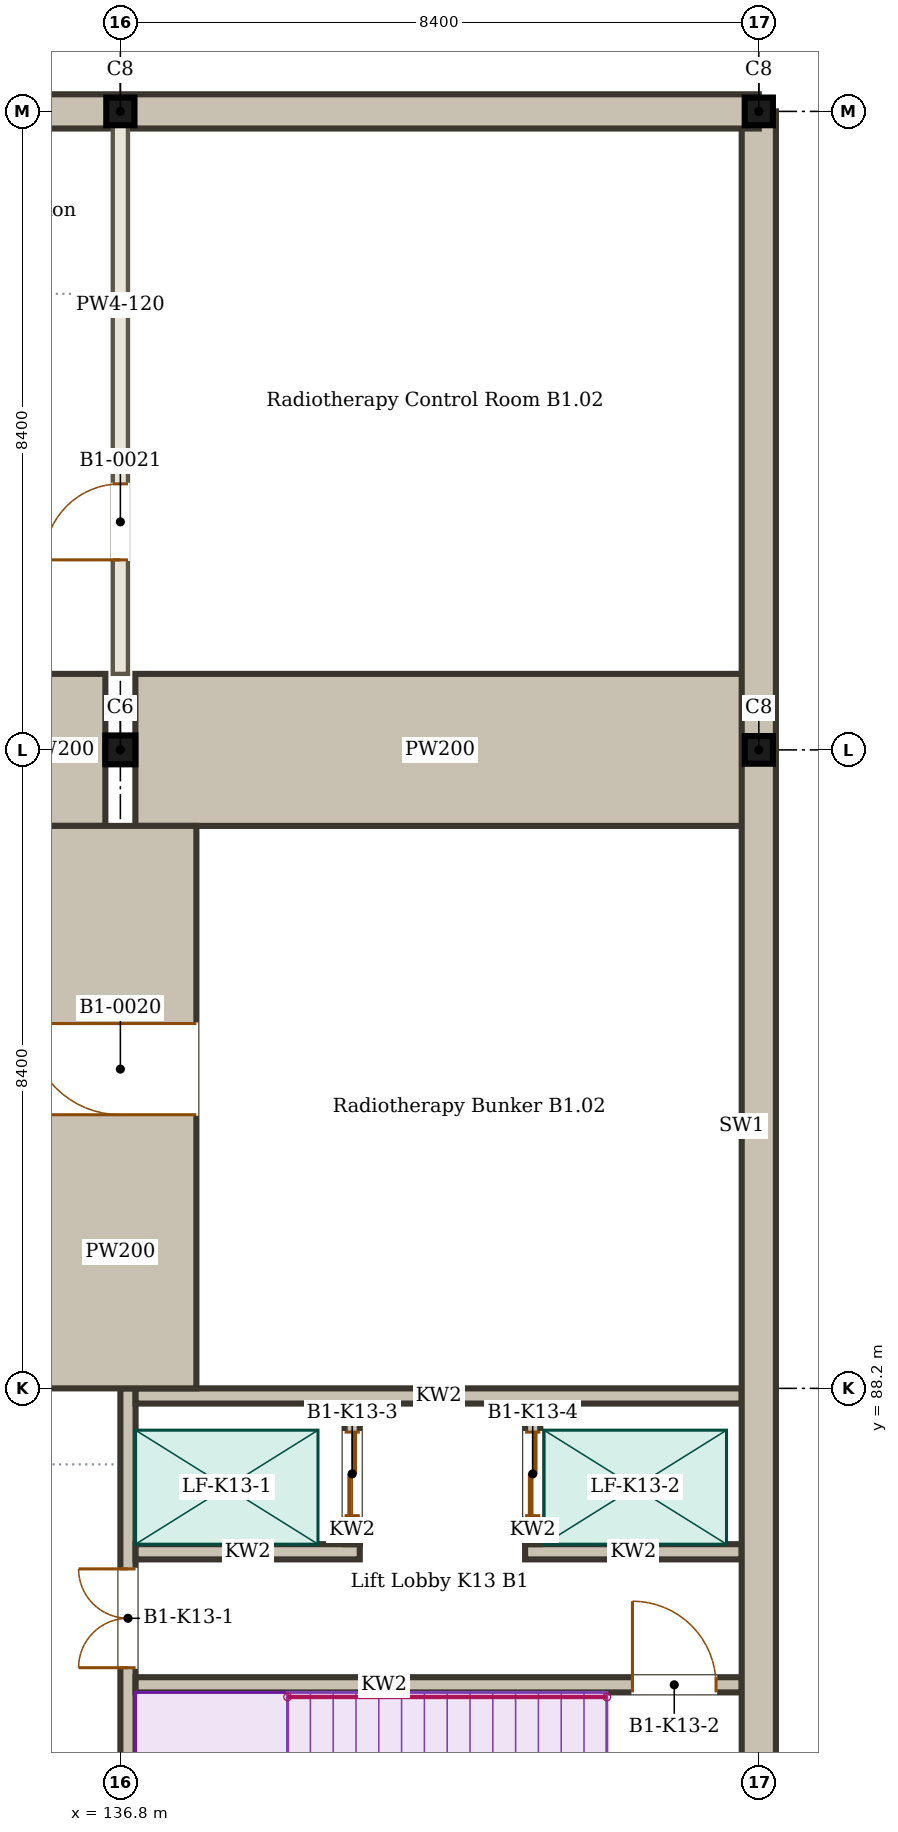
"""IFC4 building model, lengths in metres.
Left out: names, types, materials, properties, quantities, classifications, styles, units other than length and angle.
Written with IfcOpenShell. Run it as: python <this file> out.ifc"""

import sys

from ifc_helpers import new_model, si_unit, direction, frame, frame_2d, origin, origin_2d, place, context, subcontext, project, spatial, rectangle, i_section, extrude, element, fill, save


model = new_model("IFC4")
c1 = context("Model", 3, precision=1e-05, world=origin(), true_north=direction((0.0, 1.0)))
c2 = subcontext(c1, "Body", "Model", "MODEL_VIEW")
j1 = project(units=[si_unit("LENGTHUNIT", "METRE"), si_unit("PLANEANGLEUNIT", "RADIAN")], contexts=[c1])
p1 = place(None, origin())
s1 = spatial("IfcSite", under=j1, at=p1, CompositionType="ELEMENT")
p2 = place(p1, origin())
s2 = spatial("IfcBuilding", under=s1, at=p2, CompositionType="ELEMENT")
p3 = place(p2, frame((0.0, 0.0, -4.5)))
s3 = spatial("IfcBuildingStorey", under=s2, at=p3, CompositionType="ELEMENT", Elevation=-4.5)
p4 = place(p3, frame((136.8, 96.6, 0.0), z_axis=(0.0, 0.0, 1.0), x_axis=(1.0, 0.0, 0.0)))
e1 = element("IfcColumn", 1, at=p4, inside=s3, PredefinedType="COLUMN", context=c2, shape_type="SweptSolid", body=[
    extrude(i_section(OverallWidth=0.395, OverallDepth=0.38, WebThickness=0.019, FlangeThickness=0.03, FilletRadius=0.027, at=origin_2d()), origin(), (0.0, 0.0, 1.0), 4.5),
])
for number, where, z_axis, x_axis in (
    (2, (145.2, 96.6, 0.0), (0.0, 0.0, 1.0), (1.0, 0.0, 0.0)),
    (3, (136.8, 105.0, 0.0), (0.0, 0.0, 1.0), (1.0, 0.0, 0.0)),
    (4, (145.2, 105.0, 0.0), (0.0, 0.0, 1.0), (1.0, 0.0, 0.0)),
):
    element("IfcColumn", number, at=place(p3, frame(where, z_axis=z_axis, x_axis=x_axis)), inside=s3, PredefinedType="COLUMN", context=c2, shape_type="SweptSolid", body=[
        extrude(i_section(OverallWidth=0.371, OverallDepth=0.364, WebThickness=0.013, FlangeThickness=0.022, FilletRadius=0.027, at=origin_2d()), origin(), (0.0, 0.0, 1.0), 4.5),
    ])
p5 = place(p3, frame((145.2, 29.4, 0.0), z_axis=(0.0, 0.0, 1.0), x_axis=(0.0, 1.0, 0.0)))
e5 = element("IfcWall", 5, at=p5, inside=s3, PredefinedType="SOLIDWALL", context=c2, shape_type="SweptSolid", body=[
    extrude(rectangle(XDim=75.6, YDim=0.45, at=frame_2d((37.8, 0.0))), origin(), (0.0, 0.0, 1.0), 4.35),
])
p6 = place(p3, frame((145.2, 105.0, 0.0), z_axis=(0.0, 0.0, 1.0), x_axis=(-1.0, 0.0, 0.0)))
e6 = element("IfcWall", 6, at=p6, inside=s3, PredefinedType="SOLIDWALL", context=c2, shape_type="SweptSolid", body=[
    extrude(rectangle(XDim=33.6, YDim=0.45, at=frame_2d((16.8, 0.0))), origin(), (0.0, 0.0, 1.0), 4.35),
])
p7 = place(p3, frame((135.8, 96.6, 0.0), z_axis=(0.0, 0.0, 1.0), x_axis=(1.0, 0.0, 0.0)))
e7 = element("IfcWall", 7, at=p7, inside=s3, PredefinedType="SOLIDWALL", context=c2, shape_type="SweptSolid", body=[
    extrude(rectangle(XDim=0.802, YDim=2.0, at=frame_2d((0.401, 0.0))), origin(), (0.0, 0.0, 1.0), 3.8),
])
p8 = place(p3, frame((136.998, 96.6, 0.0), z_axis=(0.0, 0.0, 1.0), x_axis=(1.0, 0.0, 0.0)))
e8 = element("IfcWall", 8, at=p8, inside=s3, PredefinedType="SOLIDWALL", context=c2, shape_type="SweptSolid", body=[
    extrude(rectangle(XDim=8.017, YDim=2.0, at=frame_2d((4.008, 0.0))), origin(), (0.0, 0.0, 1.0), 3.8),
])
p9 = place(p3, frame((136.8, 88.2, 0.0), z_axis=(0.0, 0.0, 1.0), x_axis=(0.0, 1.0, 0.0)))
e9 = element("IfcWall", 9, at=p9, inside=s3, PredefinedType="SOLIDWALL", context=c2, shape_type="SweptSolid", body=[
    extrude(rectangle(XDim=7.4, YDim=2.0, at=frame_2d((3.7, 0.0))), origin(), (0.0, 0.0, 1.0), 3.8),
])
p10 = place(p9, frame((3.6, 0.0, 0.0)))
e10 = element("IfcOpeningElement", 10, at=p10, cuts=e9, PredefinedType="OPENING", context=c2, shape_type="SweptSolid", body=[
    extrude(rectangle(XDim=1.2, YDim=2.1, at=frame_2d((0.6, 1.05))), frame((0.0, 1.01, 0.0), z_axis=(0.0, -1.0, 0.0), x_axis=(1.0, 0.0, 0.0)), (0.0, 0.0, 1.0), 2.02),
])
p11 = place(p3, frame((136.8, 97.6, 0.0), z_axis=(0.0, 0.0, 1.0), x_axis=(0.0, 1.0, 0.0)))
e11 = element("IfcWall", 11, at=p11, inside=s3, PredefinedType="PARTITIONING", context=c2, shape_type="SweptSolid", body=[
    extrude(rectangle(XDim=7.214, YDim=0.2, at=frame_2d((3.607, 0.0))), origin(), (0.0, 0.0, 1.0), 3.8),
])
p12 = place(p11, frame((1.5, 0.0, 0.0)))
e12 = element("IfcOpeningElement", 12, at=p12, cuts=e11, PredefinedType="OPENING", context=c2, shape_type="SweptSolid", body=[
    extrude(rectangle(XDim=1.0, YDim=2.1, at=frame_2d((0.5, 1.05))), frame((0.0, 0.11, 0.0), z_axis=(0.0, -1.0, 0.0), x_axis=(1.0, 0.0, 0.0)), (0.0, 0.0, 1.0), 0.22),
])
p13 = place(p3, frame((136.9, 79.8, 0.0), z_axis=(0.0, 0.0, 1.0), x_axis=(0.0, 1.0, 0.0)))
e13 = element("IfcWall", 13, at=p13, inside=s3, PredefinedType="SOLIDWALL", context=c2, shape_type="SweptSolid", body=[
    extrude(rectangle(XDim=8.4, YDim=0.2, at=frame_2d((4.2, 0.0))), origin(), (0.0, 0.0, 1.0), 4.5),
])
p14 = place(p13, frame((4.725, 0.0, 0.0)))
e14 = element("IfcOpeningElement", 14, at=p14, cuts=e13, PredefinedType="OPENING", context=c2, shape_type="SweptSolid", body=[
    extrude(rectangle(XDim=1.3, YDim=2.1, at=frame_2d((0.65, 1.05))), frame((0.0, 0.11, 0.0), z_axis=(0.0, -1.0, 0.0), x_axis=(1.0, 0.0, 0.0)), (0.0, 0.0, 1.0), 0.22),
])
p15 = place(p3, frame((137.0, 88.1, 0.0), z_axis=(0.0, 0.0, 1.0), x_axis=(1.0, 0.0, 0.0)))
e15 = element("IfcWall", 15, at=p15, inside=s3, PredefinedType="SOLIDWALL", context=c2, shape_type="SweptSolid", body=[
    extrude(rectangle(XDim=7.975, YDim=0.2, at=frame_2d((3.988, 0.0))), origin(), (0.0, 0.0, 1.0), 4.5),
])
p16 = place(p3, frame((137.0, 84.3, 0.0), z_axis=(0.0, 0.0, 1.0), x_axis=(1.0, 0.0, 0.0)))
e16 = element("IfcWall", 16, at=p16, inside=s3, PredefinedType="SOLIDWALL", context=c2, shape_type="SweptSolid", body=[
    extrude(rectangle(XDim=7.975, YDim=0.2, at=frame_2d((3.988, 0.0))), origin(), (0.0, 0.0, 1.0), 4.5),
])
p17 = place(p16, frame((6.538, 0.0, 0.0)))
e17 = element("IfcOpeningElement", 17, at=p17, cuts=e16, PredefinedType="OPENING", context=c2, shape_type="SweptSolid", body=[
    extrude(rectangle(XDim=1.1, YDim=2.1, at=frame_2d((0.55, 1.05))), frame((0.0, 0.11, 0.0), z_axis=(0.0, -1.0, 0.0), x_axis=(1.0, 0.0, 0.0)), (0.0, 0.0, 1.0), 0.22),
])
p18 = place(p3, frame((137.0, 86.05, 0.0), z_axis=(0.0, 0.0, 1.0), x_axis=(1.0, 0.0, 0.0)))
e18 = element("IfcWall", 18, at=p18, inside=s3, PredefinedType="SOLIDWALL", context=c2, shape_type="SweptSolid", body=[
    extrude(rectangle(XDim=2.95, YDim=0.2, at=frame_2d((1.475, 0.0))), origin(), (0.0, 0.0, 1.0), 4.5),
])
p19 = place(p3, frame((142.125, 86.05, 0.0), z_axis=(0.0, 0.0, 1.0), x_axis=(1.0, 0.0, 0.0)))
e19 = element("IfcWall", 19, at=p19, inside=s3, PredefinedType="SOLIDWALL", context=c2, shape_type="SweptSolid", body=[
    extrude(rectangle(XDim=2.85, YDim=0.2, at=frame_2d((1.425, 0.0))), origin(), (0.0, 0.0, 1.0), 4.5),
])
p20 = place(p3, frame((139.85, 86.15, 0.0), z_axis=(0.0, 0.0, 1.0), x_axis=(0.0, 1.0, 0.0)))
e20 = element("IfcWall", 20, at=p20, inside=s3, PredefinedType="SOLIDWALL", context=c2, shape_type="SweptSolid", body=[
    extrude(rectangle(XDim=1.85, YDim=0.2, at=frame_2d((0.925, 0.0))), origin(), (0.0, 0.0, 1.0), 4.5),
])
p21 = place(p20, frame((0.375, 0.0, 0.0)))
e21 = element("IfcOpeningElement", 21, at=p21, cuts=e20, PredefinedType="OPENING", context=c2, shape_type="SweptSolid", body=[
    extrude(rectangle(XDim=1.1, YDim=2.1, at=frame_2d((0.55, 1.05))), frame((0.0, 0.11, 0.0), z_axis=(0.0, -1.0, 0.0), x_axis=(1.0, 0.0, 0.0)), (0.0, 0.0, 1.0), 0.22),
])
p22 = place(p3, frame((142.225, 86.15, 0.0), z_axis=(0.0, 0.0, 1.0), x_axis=(0.0, 1.0, 0.0)))
e22 = element("IfcWall", 22, at=p22, inside=s3, PredefinedType="SOLIDWALL", context=c2, shape_type="SweptSolid", body=[
    extrude(rectangle(XDim=1.85, YDim=0.2, at=frame_2d((0.925, 0.0))), origin(), (0.0, 0.0, 1.0), 4.5),
])
p23 = place(p22, frame((0.375, 0.0, 0.0)))
e23 = element("IfcOpeningElement", 23, at=p23, cuts=e22, PredefinedType="OPENING", context=c2, shape_type="SweptSolid", body=[
    extrude(rectangle(XDim=1.1, YDim=2.1, at=frame_2d((0.55, 1.05))), frame((0.0, 0.11, 0.0), z_axis=(0.0, -1.0, 0.0), x_axis=(1.0, 0.0, 0.0)), (0.0, 0.0, 1.0), 0.22),
])
p24 = place(p10, origin())
e24 = element("IfcDoor", 24, at=p24, inside=s3, OperationType="SINGLE_SWING_RIGHT", PredefinedType="DOOR", context=c2, shape_type="SweptSolid", body=[
    extrude(rectangle(XDim=1.2, YDim=2.1, at=frame_2d((0.6, 1.05))), frame((0.0, 0.025, 0.0), z_axis=(0.0, -1.0, 0.0), x_axis=(1.0, 0.0, 0.0)), (0.0, 0.0, 1.0), 0.05),
])
fill(e10, e24)
p25 = place(p12, origin())
e25 = element("IfcDoor", 25, at=p25, inside=s3, OperationType="SINGLE_SWING_LEFT", PredefinedType="DOOR", context=c2, shape_type="SweptSolid", body=[
    extrude(rectangle(XDim=1.0, YDim=2.1, at=frame_2d((0.5, 1.05))), frame((0.0, 0.025, 0.0), z_axis=(0.0, -1.0, 0.0), x_axis=(1.0, 0.0, 0.0)), (0.0, 0.0, 1.0), 0.05),
])
fill(e12, e25)
p26 = place(p14, origin())
e26 = element("IfcDoor", 26, at=p26, inside=s3, OperationType="DOUBLE_DOOR_DOUBLE_SWING", PredefinedType="DOOR", context=c2, shape_type="SweptSolid", body=[
    extrude(rectangle(XDim=1.3, YDim=2.1, at=frame_2d((0.65, 1.05))), frame((0.0, 0.025, 0.0), z_axis=(0.0, -1.0, 0.0), x_axis=(1.0, 0.0, 0.0)), (0.0, 0.0, 1.0), 0.05),
])
fill(e14, e26)
p27 = place(p17, origin())
e27 = element("IfcDoor", 27, at=p27, inside=s3, OperationType="SINGLE_SWING_LEFT", PredefinedType="DOOR", context=c2, shape_type="SweptSolid", body=[
    extrude(rectangle(XDim=1.1, YDim=2.1, at=frame_2d((0.55, 1.05))), frame((0.0, 0.025, 0.0), z_axis=(0.0, -1.0, 0.0), x_axis=(1.0, 0.0, 0.0)), (0.0, 0.0, 1.0), 0.05),
])
fill(e17, e27)
p28 = place(p21, origin())
e28 = element("IfcDoor", 28, at=p28, inside=s3, OperationType="DOUBLE_DOOR_SLIDING", PredefinedType="DOOR", context=c2, shape_type="SweptSolid", body=[
    extrude(rectangle(XDim=1.1, YDim=2.1, at=frame_2d((0.55, 1.05))), frame((0.0, 0.025, 0.0), z_axis=(0.0, -1.0, 0.0), x_axis=(1.0, 0.0, 0.0)), (0.0, 0.0, 1.0), 0.05),
])
fill(e21, e28)
p29 = place(p23, origin())
e29 = element("IfcDoor", 29, at=p29, inside=s3, OperationType="DOUBLE_DOOR_SLIDING", PredefinedType="DOOR", context=c2, shape_type="SweptSolid", body=[
    extrude(rectangle(XDim=1.1, YDim=2.1, at=frame_2d((0.55, 1.05))), frame((0.0, 0.025, 0.0), z_axis=(0.0, -1.0, 0.0), x_axis=(1.0, 0.0, 0.0)), (0.0, 0.0, 1.0), 0.05),
])
fill(e23, e29)
save(model, sys.argv[1])
